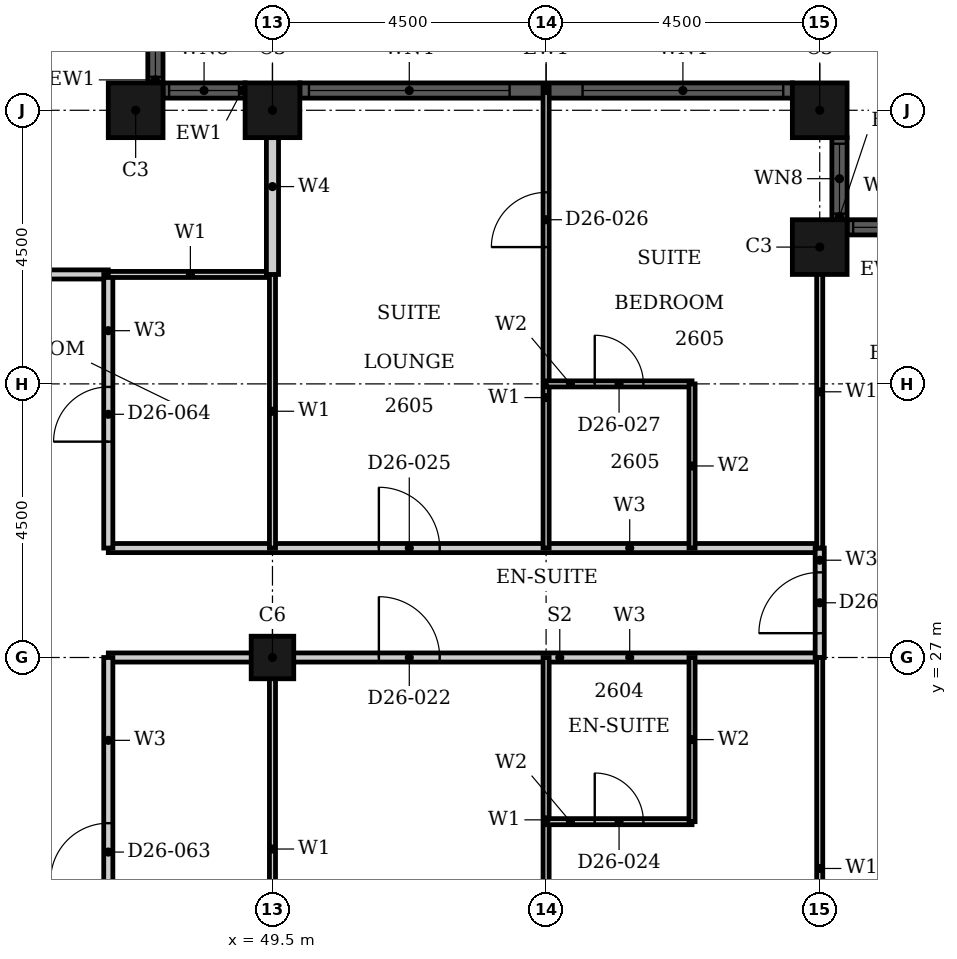
"""IFC4 building model, lengths in metres.
Left out: names, types, materials, properties, quantities, classifications, styles, units other than length and angle.
Written with IfcOpenShell. Run it as: python <this file> out.ifc"""

import sys

from ifc_helpers import new_model, si_unit, direction, frame, frame_2d, origin, origin_2d, place, context, subcontext, project, spatial, rectangle, hollow_rectangle, extrude, element, fill, save


model = new_model("IFC4")
c1 = context("Model", 3, precision=1e-05, world=origin(), true_north=direction((0.0, 1.0)))
c2 = subcontext(c1, "Body", "Model", "MODEL_VIEW")
j1 = project(units=[si_unit("LENGTHUNIT", "METRE"), si_unit("PLANEANGLEUNIT", "RADIAN")], contexts=[c1])
p1 = place(None, origin())
s1 = spatial("IfcSite", under=j1, at=p1, CompositionType="ELEMENT")
p2 = place(p1, origin())
s2 = spatial("IfcBuilding", under=s1, at=p2, CompositionType="ELEMENT")
p3 = place(p2, frame((0.0, 0.0, 108.0)))
s3 = spatial("IfcBuildingStorey", under=s2, at=p3, CompositionType="ELEMENT", Elevation=108.0)
for number, where, z_axis, x_axis in (
    (1, (58.5, 33.75, 0.0), (0.0, 0.0, 1.0), (1.0, 0.0, 0.0)),
    (2, (58.5, 36.0, 0.0), (0.0, 0.0, 1.0), (1.0, 0.0, 0.0)),
    (3, (49.5, 36.0, 0.0), (0.0, 0.0, 1.0), (1.0, 0.0, 0.0)),
    (4, (47.25, 36.0, 0.0), (0.0, 0.0, 1.0), (1.0, 0.0, 0.0)),
):
    element("IfcColumn", number, at=place(p3, frame(where, z_axis=z_axis, x_axis=x_axis)), inside=s3, PredefinedType="COLUMN", context=c2, shape_type="SweptSolid", body=[
        extrude(hollow_rectangle(XDim=0.9, YDim=0.9, WallThickness=0.028, at=origin_2d()), origin(), (0.0, 0.0, 1.0), 3.6),
    ])
p4 = place(p3, frame((49.5, 27.0, 0.0), z_axis=(0.0, 0.0, 1.0), x_axis=(1.0, 0.0, 0.0)))
e5 = element("IfcColumn", 5, at=p4, inside=s3, PredefinedType="COLUMN", context=c2, shape_type="SweptSolid", body=[
    extrude(hollow_rectangle(XDim=0.7, YDim=0.7, WallThickness=0.022, at=origin_2d()), origin(), (0.0, 0.0, 1.0), 3.6),
])
p5 = place(p3, frame((60.3, 34.075, 0.0), z_axis=(0.0, 0.0, 1.0), x_axis=(-1.0, 0.0, 0.0)))
e6 = element("IfcWall", 6, at=p5, inside=s3, PredefinedType="SOLIDWALL", context=c2, shape_type="SweptSolid", body=[
    extrude(rectangle(XDim=1.35, YDim=0.25, at=frame_2d((0.675, 0.0))), origin(), (0.0, 0.0, 1.0), 3.6),
])
p6 = place(p5, frame((0.1, 0.0, 0.9)))
e7 = element("IfcOpeningElement", 7, at=p6, cuts=e6, PredefinedType="OPENING", context=c2, shape_type="SweptSolid", body=[
    extrude(rectangle(XDim=1.15, YDim=2.08, at=frame_2d((0.575, 1.04))), frame((0.0, 0.135, 0.0), z_axis=(0.0, -1.0, 0.0), x_axis=(1.0, 0.0, 0.0)), (0.0, 0.0, 1.0), 0.27),
])
p7 = place(p3, frame((58.825, 34.2, 0.0), z_axis=(0.0, 0.0, 1.0), x_axis=(0.0, 1.0, 0.0)))
e8 = element("IfcWall", 8, at=p7, inside=s3, PredefinedType="SOLIDWALL", context=c2, shape_type="SweptSolid", body=[
    extrude(rectangle(XDim=1.35, YDim=0.25, at=frame_2d((0.675, 0.0))), origin(), (0.0, 0.0, 1.0), 3.6),
])
p8 = place(p7, frame((0.1, 0.0, 0.9)))
e9 = element("IfcOpeningElement", 9, at=p8, cuts=e8, PredefinedType="OPENING", context=c2, shape_type="SweptSolid", body=[
    extrude(rectangle(XDim=1.15, YDim=2.08, at=frame_2d((0.575, 1.04))), frame((0.0, 0.135, 0.0), z_axis=(0.0, -1.0, 0.0), x_axis=(1.0, 0.0, 0.0)), (0.0, 0.0, 1.0), 0.27),
])
p9 = place(p3, frame((58.05, 36.325, 0.0), z_axis=(0.0, 0.0, 1.0), x_axis=(-1.0, 0.0, 0.0)))
e10 = element("IfcWall", 10, at=p9, inside=s3, PredefinedType="SOLIDWALL", context=c2, shape_type="SweptSolid", body=[
    extrude(rectangle(XDim=8.1, YDim=0.25, at=frame_2d((4.05, 0.0))), origin(), (0.0, 0.0, 1.0), 3.6),
])
p10 = place(p9, frame((0.15, 0.0, 0.9)))
e11 = element("IfcOpeningElement", 11, at=p10, cuts=e10, PredefinedType="OPENING", context=c2, shape_type="SweptSolid", body=[
    extrude(rectangle(XDim=3.3, YDim=2.08, at=frame_2d((1.65, 1.04))), frame((0.0, 0.135, 0.0), z_axis=(0.0, -1.0, 0.0), x_axis=(1.0, 0.0, 0.0)), (0.0, 0.0, 1.0), 0.27),
])
p11 = place(p9, frame((4.65, 0.0, 0.9)))
e12 = element("IfcOpeningElement", 12, at=p11, cuts=e10, PredefinedType="OPENING", context=c2, shape_type="SweptSolid", body=[
    extrude(rectangle(XDim=3.3, YDim=2.08, at=frame_2d((1.65, 1.04))), frame((0.0, 0.135, 0.0), z_axis=(0.0, -1.0, 0.0), x_axis=(1.0, 0.0, 0.0)), (0.0, 0.0, 1.0), 0.27),
])
p12 = place(p3, frame((49.05, 36.325, 0.0), z_axis=(0.0, 0.0, 1.0), x_axis=(-1.0, 0.0, 0.0)))
e13 = element("IfcWall", 13, at=p12, inside=s3, PredefinedType="SOLIDWALL", context=c2, shape_type="SweptSolid", body=[
    extrude(rectangle(XDim=1.35, YDim=0.25, at=frame_2d((0.675, 0.0))), origin(), (0.0, 0.0, 1.0), 3.6),
])
p13 = place(p12, frame((0.1, 0.0, 0.9)))
e14 = element("IfcOpeningElement", 14, at=p13, cuts=e13, PredefinedType="OPENING", context=c2, shape_type="SweptSolid", body=[
    extrude(rectangle(XDim=1.15, YDim=2.08, at=frame_2d((0.575, 1.04))), frame((0.0, 0.135, 0.0), z_axis=(0.0, -1.0, 0.0), x_axis=(1.0, 0.0, 0.0)), (0.0, 0.0, 1.0), 0.27),
])
p14 = place(p3, frame((47.575, 36.45, 0.0), z_axis=(0.0, 0.0, 1.0), x_axis=(0.0, 1.0, 0.0)))
e15 = element("IfcWall", 15, at=p14, inside=s3, PredefinedType="SOLIDWALL", context=c2, shape_type="SweptSolid", body=[
    extrude(rectangle(XDim=1.35, YDim=0.25, at=frame_2d((0.675, 0.0))), origin(), (0.0, 0.0, 1.0), 3.6),
])
p15 = place(p14, frame((0.1, 0.0, 0.9)))
e16 = element("IfcOpeningElement", 16, at=p15, cuts=e15, PredefinedType="OPENING", context=c2, shape_type="SweptSolid", body=[
    extrude(rectangle(XDim=1.15, YDim=2.08, at=frame_2d((0.575, 1.04))), frame((0.0, 0.135, 0.0), z_axis=(0.0, -1.0, 0.0), x_axis=(1.0, 0.0, 0.0)), (0.0, 0.0, 1.0), 0.27),
])
p16 = place(p3, frame((46.8, 27.0, 0.0), z_axis=(0.0, 0.0, 1.0), x_axis=(1.0, 0.0, 0.0)))
e17 = element("IfcWall", 17, at=p16, inside=s3, PredefinedType="PARTITIONING", context=c2, shape_type="SweptSolid", body=[
    extrude(rectangle(XDim=11.7, YDim=0.15, at=frame_2d((5.85, 0.0))), origin(), (0.0, 0.0, 1.0), 2.58),
])
p17 = place(p16, frame((4.45, 0.0, 0.0)))
e18 = element("IfcOpeningElement", 18, at=p17, cuts=e17, PredefinedType="OPENING", context=c2, shape_type="SweptSolid", body=[
    extrude(rectangle(XDim=1.0, YDim=2.1, at=frame_2d((0.5, 1.05))), frame((0.0, 0.085, 0.0), z_axis=(0.0, -1.0, 0.0), x_axis=(1.0, 0.0, 0.0)), (0.0, 0.0, 1.0), 0.17),
])
p18 = place(p3, frame((46.8, 28.8, 0.0), z_axis=(0.0, 0.0, 1.0), x_axis=(1.0, 0.0, 0.0)))
e19 = element("IfcWall", 19, at=p18, inside=s3, PredefinedType="PARTITIONING", context=c2, shape_type="SweptSolid", body=[
    extrude(rectangle(XDim=11.7, YDim=0.15, at=frame_2d((5.85, 0.0))), origin(), (0.0, 0.0, 1.0), 3.3),
])
p19 = place(p18, frame((4.45, 0.0, 0.0)))
e20 = element("IfcOpeningElement", 20, at=p19, cuts=e19, PredefinedType="OPENING", context=c2, shape_type="SweptSolid", body=[
    extrude(rectangle(XDim=1.0, YDim=2.1, at=frame_2d((0.5, 1.05))), frame((0.0, 0.085, 0.0), z_axis=(0.0, -1.0, 0.0), x_axis=(1.0, 0.0, 0.0)), (0.0, 0.0, 1.0), 0.17),
])
p20 = place(p3, frame((33.3, 33.3, 0.0), z_axis=(0.0, 0.0, 1.0), x_axis=(1.0, 0.0, 0.0)))
e21 = element("IfcWall", 21, at=p20, inside=s3, PredefinedType="PARTITIONING", context=c2, shape_type="SweptSolid", body=[
    extrude(rectangle(XDim=13.5, YDim=0.15, at=frame_2d((6.75, 0.0))), origin(), (0.0, 0.0, 1.0), 3.3),
])
p21 = place(p20, frame((10.15, 0.0, 0.0)))
e22 = element("IfcOpeningElement", 22, at=p21, cuts=e21, PredefinedType="OPENING", context=c2, shape_type="SweptSolid", body=[
    extrude(rectangle(XDim=1.0, YDim=2.1, at=frame_2d((0.5, 1.05))), frame((0.0, 0.085, 0.0), z_axis=(0.0, -1.0, 0.0), x_axis=(1.0, 0.0, 0.0)), (0.0, 0.0, 1.0), 0.17),
])
p22 = place(p20, frame((0.75, 0.0, 0.0)))
e23 = element("IfcOpeningElement", 23, at=p22, cuts=e21, PredefinedType="OPENING", context=c2, shape_type="SweptSolid", body=[
    extrude(rectangle(XDim=0.9, YDim=2.1, at=frame_2d((0.45, 1.05))), frame((0.0, 0.085, 0.0), z_axis=(0.0, -1.0, 0.0), x_axis=(1.0, 0.0, 0.0)), (0.0, 0.0, 1.0), 0.17),
])
p23 = place(p20, frame((4.35, 0.0, 0.0)))
e24 = element("IfcOpeningElement", 24, at=p23, cuts=e21, PredefinedType="OPENING", context=c2, shape_type="SweptSolid", body=[
    extrude(rectangle(XDim=0.9, YDim=2.1, at=frame_2d((0.45, 1.05))), frame((0.0, 0.085, 0.0), z_axis=(0.0, -1.0, 0.0), x_axis=(1.0, 0.0, 0.0)), (0.0, 0.0, 1.0), 0.17),
])
p24 = place(p3, frame((46.8, 28.8, 0.0), z_axis=(0.0, 0.0, 1.0), x_axis=(0.0, 1.0, 0.0)))
e25 = element("IfcWall", 25, at=p24, inside=s3, PredefinedType="PARTITIONING", context=c2, shape_type="SweptSolid", body=[
    extrude(rectangle(XDim=4.5, YDim=0.15, at=frame_2d((2.25, 0.0))), origin(), (0.0, 0.0, 1.0), 3.3),
])
p25 = place(p24, frame((1.75, 0.0, 0.0)))
e26 = element("IfcOpeningElement", 26, at=p25, cuts=e25, PredefinedType="OPENING", context=c2, shape_type="SweptSolid", body=[
    extrude(rectangle(XDim=0.9, YDim=2.1, at=frame_2d((0.45, 1.05))), frame((0.0, 0.085, 0.0), z_axis=(0.0, -1.0, 0.0), x_axis=(1.0, 0.0, 0.0)), (0.0, 0.0, 1.0), 0.17),
])
p26 = place(p3, frame((46.8, 20.7, 0.0), z_axis=(0.0, 0.0, 1.0), x_axis=(0.0, 1.0, 0.0)))
e27 = element("IfcWall", 27, at=p26, inside=s3, PredefinedType="PARTITIONING", context=c2, shape_type="SweptSolid", body=[
    extrude(rectangle(XDim=6.3, YDim=0.15, at=frame_2d((3.15, 0.0))), origin(), (0.0, 0.0, 1.0), 3.3),
])
p27 = place(p26, frame((2.625, 0.0, 0.0)))
e28 = element("IfcOpeningElement", 28, at=p27, cuts=e27, PredefinedType="OPENING", context=c2, shape_type="SweptSolid", body=[
    extrude(rectangle(XDim=0.95, YDim=2.1, at=frame_2d((0.475, 1.05))), frame((0.0, 0.085, 0.0), z_axis=(0.0, -1.0, 0.0), x_axis=(1.0, 0.0, 0.0)), (0.0, 0.0, 1.0), 0.17),
])
p28 = place(p3, frame((58.5, 27.0, 0.0), z_axis=(0.0, 0.0, 1.0), x_axis=(0.0, 1.0, 0.0)))
e29 = element("IfcWall", 29, at=p28, inside=s3, PredefinedType="PARTITIONING", context=c2, shape_type="SweptSolid", body=[
    extrude(rectangle(XDim=1.8, YDim=0.15, at=frame_2d((0.9, 0.0))), origin(), (0.0, 0.0, 1.0), 3.3),
])
p29 = place(p28, frame((0.4, 0.0, 0.0)))
e30 = element("IfcOpeningElement", 30, at=p29, cuts=e29, PredefinedType="OPENING", context=c2, shape_type="SweptSolid", body=[
    extrude(rectangle(XDim=1.0, YDim=2.1, at=frame_2d((0.5, 1.05))), frame((0.0, 0.085, 0.0), z_axis=(0.0, -1.0, 0.0), x_axis=(1.0, 0.0, 0.0)), (0.0, 0.0, 1.0), 0.17),
])
p30 = place(p3, frame((46.8, 33.3, 0.0), z_axis=(0.0, 0.0, 1.0), x_axis=(1.0, 0.0, 0.0)))
e31 = element("IfcWall", 31, at=p30, inside=s3, PredefinedType="PARTITIONING", context=c2, shape_type="SweptSolid", body=[
    extrude(rectangle(XDim=2.7, YDim=0.1, at=frame_2d((1.35, 0.0))), origin(), (0.0, 0.0, 1.0), 3.3),
])
p31 = place(p3, frame((49.5, 28.8, 0.0), z_axis=(0.0, 0.0, 1.0), x_axis=(0.0, 1.0, 0.0)))
e32 = element("IfcWall", 32, at=p31, inside=s3, PredefinedType="PARTITIONING", context=c2, shape_type="SweptSolid", body=[
    extrude(rectangle(XDim=4.5, YDim=0.1, at=frame_2d((2.25, 0.0))), origin(), (0.0, 0.0, 1.0), 2.38),
])
p32 = place(p3, frame((49.5, 20.7, 0.0), z_axis=(0.0, 0.0, 1.0), x_axis=(0.0, 1.0, 0.0)))
e33 = element("IfcWall", 33, at=p32, inside=s3, PredefinedType="PARTITIONING", context=c2, shape_type="SweptSolid", body=[
    extrude(rectangle(XDim=6.3, YDim=0.1, at=frame_2d((3.15, 0.0))), origin(), (0.0, 0.0, 1.0), 2.38),
])
p33 = place(p3, frame((54.0, 28.8, 0.0), z_axis=(0.0, 0.0, 1.0), x_axis=(0.0, 1.0, 0.0)))
e34 = element("IfcWall", 34, at=p33, inside=s3, PredefinedType="PARTITIONING", context=c2, shape_type="SweptSolid", body=[
    extrude(rectangle(XDim=7.59, YDim=0.1, at=frame_2d((3.795, 0.0))), origin(), (0.0, 0.0, 1.0), 3.3),
])
p34 = place(p33, frame((4.95, 0.0, 0.0)))
e35 = element("IfcOpeningElement", 35, at=p34, cuts=e34, PredefinedType="OPENING", context=c2, shape_type="SweptSolid", body=[
    extrude(rectangle(XDim=0.9, YDim=2.1, at=frame_2d((0.45, 1.05))), frame((0.0, 0.06, 0.0), z_axis=(0.0, -1.0, 0.0), x_axis=(1.0, 0.0, 0.0)), (0.0, 0.0, 1.0), 0.12),
])
p35 = place(p3, frame((54.0, 17.61, 0.0), z_axis=(0.0, 0.0, 1.0), x_axis=(0.0, 1.0, 0.0)))
e36 = element("IfcWall", 36, at=p35, inside=s3, PredefinedType="PARTITIONING", context=c2, shape_type="SweptSolid", body=[
    extrude(rectangle(XDim=9.39, YDim=0.1, at=frame_2d((4.695, 0.0))), origin(), (0.0, 0.0, 1.0), 3.3),
])
p36 = place(p35, frame((3.15, 0.0, 0.0)))
e37 = element("IfcOpeningElement", 37, at=p36, cuts=e36, PredefinedType="OPENING", context=c2, shape_type="SweptSolid", body=[
    extrude(rectangle(XDim=0.9, YDim=2.1, at=frame_2d((0.45, 1.05))), frame((0.0, 0.06, 0.0), z_axis=(0.0, -1.0, 0.0), x_axis=(1.0, 0.0, 0.0)), (0.0, 0.0, 1.0), 0.12),
])
p37 = place(p3, frame((58.5, 28.8, 0.0), z_axis=(0.0, 0.0, 1.0), x_axis=(0.0, 1.0, 0.0)))
e38 = element("IfcWall", 38, at=p37, inside=s3, PredefinedType="PARTITIONING", context=c2, shape_type="SweptSolid", body=[
    extrude(rectangle(XDim=5.14, YDim=0.1, at=frame_2d((2.57, 0.0))), origin(), (0.0, 0.0, 1.0), 3.3),
])
p38 = place(p3, frame((58.5, 20.06, 0.0), z_axis=(0.0, 0.0, 1.0), x_axis=(0.0, 1.0, 0.0)))
e39 = element("IfcWall", 39, at=p38, inside=s3, PredefinedType="PARTITIONING", context=c2, shape_type="SweptSolid", body=[
    extrude(rectangle(XDim=6.94, YDim=0.1, at=frame_2d((3.47, 0.0))), origin(), (0.0, 0.0, 1.0), 3.3),
])
p39 = place(p3, frame((49.5, 33.3, 0.0), z_axis=(0.0, 0.0, 1.0), x_axis=(0.0, 1.0, 0.0)))
e40 = element("IfcWall", 40, at=p39, inside=s3, PredefinedType="PARTITIONING", context=c2, shape_type="SweptSolid", body=[
    extrude(rectangle(XDim=2.89, YDim=0.2, at=frame_2d((1.445, 0.0))), origin(), (0.0, 0.0, 1.0), 2.38),
])
p40 = place(p3, frame((54.0, 24.3, 0.0), z_axis=(0.0, 0.0, 1.0), x_axis=(1.0, 0.0, 0.0)))
e41 = element("IfcWall", 41, at=p40, inside=s3, PredefinedType="PARTITIONING", context=c2, shape_type="SweptSolid", body=[
    extrude(rectangle(XDim=2.4, YDim=0.1, at=frame_2d((1.2, 0.0))), origin(), (0.0, 0.0, 1.0), 3.3),
])
p41 = place(p40, frame((0.8, 0.0, 0.0)))
e42 = element("IfcOpeningElement", 42, at=p41, cuts=e41, PredefinedType="OPENING", context=c2, shape_type="SweptSolid", body=[
    extrude(rectangle(XDim=0.8, YDim=2.1, at=frame_2d((0.4, 1.05))), frame((0.0, 0.06, 0.0), z_axis=(0.0, -1.0, 0.0), x_axis=(1.0, 0.0, 0.0)), (0.0, 0.0, 1.0), 0.12),
])
p42 = place(p3, frame((54.0, 31.5, 0.0), z_axis=(0.0, 0.0, 1.0), x_axis=(1.0, 0.0, 0.0)))
e43 = element("IfcWall", 43, at=p42, inside=s3, PredefinedType="PARTITIONING", context=c2, shape_type="SweptSolid", body=[
    extrude(rectangle(XDim=2.4, YDim=0.1, at=frame_2d((1.2, 0.0))), origin(), (0.0, 0.0, 1.0), 2.58),
])
p43 = place(p42, frame((0.8, 0.0, 0.0)))
e44 = element("IfcOpeningElement", 44, at=p43, cuts=e43, PredefinedType="OPENING", context=c2, shape_type="SweptSolid", body=[
    extrude(rectangle(XDim=0.8, YDim=2.1, at=frame_2d((0.4, 1.05))), frame((0.0, 0.06, 0.0), z_axis=(0.0, -1.0, 0.0), x_axis=(1.0, 0.0, 0.0)), (0.0, 0.0, 1.0), 0.12),
])
for number, where, z_axis, x_axis in (
    (45, (56.4, 28.8, 0.0), (0.0, 0.0, 1.0), (0.0, 1.0, 0.0)),
    (46, (56.4, 24.3, 0.0), (0.0, 0.0, 1.0), (0.0, 1.0, 0.0)),
):
    element("IfcWall", number, at=place(p3, frame(where, z_axis=z_axis, x_axis=x_axis)), inside=s3, PredefinedType="PARTITIONING", context=c2, shape_type="SweptSolid", body=[
        extrude(rectangle(XDim=2.7, YDim=0.1, at=frame_2d((1.35, 0.0))), origin(), (0.0, 0.0, 1.0), 3.3),
    ])
p44 = place(p6, origin())
e47 = element("IfcWindow", 47, at=p44, inside=s3, PartitioningType="SINGLE_PANEL", PredefinedType="WINDOW", context=c2, shape_type="SweptSolid", body=[
    extrude(rectangle(XDim=1.15, YDim=2.08, at=frame_2d((0.575, 1.04))), frame((0.0, 0.03, 0.0), z_axis=(0.0, -1.0, 0.0), x_axis=(1.0, 0.0, 0.0)), (0.0, 0.0, 1.0), 0.06),
])
fill(e7, e47)
p45 = place(p8, origin())
e48 = element("IfcWindow", 48, at=p45, inside=s3, PartitioningType="SINGLE_PANEL", PredefinedType="WINDOW", context=c2, shape_type="SweptSolid", body=[
    extrude(rectangle(XDim=1.15, YDim=2.08, at=frame_2d((0.575, 1.04))), frame((0.0, 0.03, 0.0), z_axis=(0.0, -1.0, 0.0), x_axis=(1.0, 0.0, 0.0)), (0.0, 0.0, 1.0), 0.06),
])
fill(e9, e48)
p46 = place(p10, origin())
e49 = element("IfcWindow", 49, at=p46, inside=s3, PartitioningType="SINGLE_PANEL", PredefinedType="WINDOW", context=c2, shape_type="SweptSolid", body=[
    extrude(rectangle(XDim=3.3, YDim=2.08, at=frame_2d((1.65, 1.04))), frame((0.0, 0.03, 0.0), z_axis=(0.0, -1.0, 0.0), x_axis=(1.0, 0.0, 0.0)), (0.0, 0.0, 1.0), 0.06),
])
fill(e11, e49)
p47 = place(p11, origin())
e50 = element("IfcWindow", 50, at=p47, inside=s3, PartitioningType="SINGLE_PANEL", PredefinedType="WINDOW", context=c2, shape_type="SweptSolid", body=[
    extrude(rectangle(XDim=3.3, YDim=2.08, at=frame_2d((1.65, 1.04))), frame((0.0, 0.03, 0.0), z_axis=(0.0, -1.0, 0.0), x_axis=(1.0, 0.0, 0.0)), (0.0, 0.0, 1.0), 0.06),
])
fill(e12, e50)
p48 = place(p13, origin())
e51 = element("IfcWindow", 51, at=p48, inside=s3, PartitioningType="SINGLE_PANEL", PredefinedType="WINDOW", context=c2, shape_type="SweptSolid", body=[
    extrude(rectangle(XDim=1.15, YDim=2.08, at=frame_2d((0.575, 1.04))), frame((0.0, 0.03, 0.0), z_axis=(0.0, -1.0, 0.0), x_axis=(1.0, 0.0, 0.0)), (0.0, 0.0, 1.0), 0.06),
])
fill(e14, e51)
p49 = place(p15, origin())
e52 = element("IfcWindow", 52, at=p49, inside=s3, PartitioningType="SINGLE_PANEL", PredefinedType="WINDOW", context=c2, shape_type="SweptSolid", body=[
    extrude(rectangle(XDim=1.15, YDim=2.08, at=frame_2d((0.575, 1.04))), frame((0.0, 0.03, 0.0), z_axis=(0.0, -1.0, 0.0), x_axis=(1.0, 0.0, 0.0)), (0.0, 0.0, 1.0), 0.06),
])
fill(e16, e52)
p50 = place(p17, origin())
e53 = element("IfcDoor", 53, at=p50, inside=s3, OperationType="SINGLE_SWING_LEFT", PredefinedType="DOOR", context=c2, shape_type="SweptSolid", body=[
    extrude(rectangle(XDim=1.0, YDim=2.1, at=frame_2d((0.5, 1.05))), frame((0.0, 0.025, 0.0), z_axis=(0.0, -1.0, 0.0), x_axis=(1.0, 0.0, 0.0)), (0.0, 0.0, 1.0), 0.05),
])
fill(e18, e53)
p51 = place(p41, origin())
e54 = element("IfcDoor", 54, at=p51, inside=s3, OperationType="SINGLE_SWING_LEFT", PredefinedType="DOOR", context=c2, shape_type="SweptSolid", body=[
    extrude(rectangle(XDim=0.8, YDim=2.1, at=frame_2d((0.4, 1.05))), frame((0.0, 0.025, 0.0), z_axis=(0.0, -1.0, 0.0), x_axis=(1.0, 0.0, 0.0)), (0.0, 0.0, 1.0), 0.05),
])
fill(e42, e54)
p52 = place(p19, origin())
e55 = element("IfcDoor", 55, at=p52, inside=s3, OperationType="SINGLE_SWING_LEFT", PredefinedType="DOOR", context=c2, shape_type="SweptSolid", body=[
    extrude(rectangle(XDim=1.0, YDim=2.1, at=frame_2d((0.5, 1.05))), frame((0.0, 0.025, 0.0), z_axis=(0.0, -1.0, 0.0), x_axis=(1.0, 0.0, 0.0)), (0.0, 0.0, 1.0), 0.05),
])
fill(e20, e55)
p53 = place(p34, origin())
e56 = element("IfcDoor", 56, at=p53, inside=s3, OperationType="SINGLE_SWING_RIGHT", PredefinedType="DOOR", context=c2, shape_type="SweptSolid", body=[
    extrude(rectangle(XDim=0.9, YDim=2.1, at=frame_2d((0.45, 1.05))), frame((0.0, 0.025, 0.0), z_axis=(0.0, -1.0, 0.0), x_axis=(1.0, 0.0, 0.0)), (0.0, 0.0, 1.0), 0.05),
])
fill(e35, e56)
p54 = place(p43, origin())
e57 = element("IfcDoor", 57, at=p54, inside=s3, OperationType="SINGLE_SWING_LEFT", PredefinedType="DOOR", context=c2, shape_type="SweptSolid", body=[
    extrude(rectangle(XDim=0.8, YDim=2.1, at=frame_2d((0.4, 1.05))), frame((0.0, 0.025, 0.0), z_axis=(0.0, -1.0, 0.0), x_axis=(1.0, 0.0, 0.0)), (0.0, 0.0, 1.0), 0.05),
])
fill(e44, e57)
p55 = place(p29, origin())
e58 = element("IfcDoor", 58, at=p55, inside=s3, OperationType="SINGLE_SWING_LEFT", PredefinedType="DOOR", context=c2, shape_type="SweptSolid", body=[
    extrude(rectangle(XDim=1.0, YDim=2.1, at=frame_2d((0.5, 1.05))), frame((0.0, 0.025, 0.0), z_axis=(0.0, -1.0, 0.0), x_axis=(1.0, 0.0, 0.0)), (0.0, 0.0, 1.0), 0.05),
])
fill(e30, e58)
p56 = place(p27, origin())
e59 = element("IfcDoor", 59, at=p56, inside=s3, OperationType="SINGLE_SWING_LEFT", PredefinedType="DOOR", context=c2, shape_type="SweptSolid", body=[
    extrude(rectangle(XDim=0.95, YDim=2.1, at=frame_2d((0.475, 1.05))), frame((0.0, 0.025, 0.0), z_axis=(0.0, -1.0, 0.0), x_axis=(1.0, 0.0, 0.0)), (0.0, 0.0, 1.0), 0.05),
])
fill(e28, e59)
p57 = place(p25, origin())
e60 = element("IfcDoor", 60, at=p57, inside=s3, OperationType="SINGLE_SWING_LEFT", PredefinedType="DOOR", context=c2, shape_type="SweptSolid", body=[
    extrude(rectangle(XDim=0.9, YDim=2.1, at=frame_2d((0.45, 1.05))), frame((0.0, 0.025, 0.0), z_axis=(0.0, -1.0, 0.0), x_axis=(1.0, 0.0, 0.0)), (0.0, 0.0, 1.0), 0.05),
])
fill(e26, e60)
save(model, sys.argv[1])
